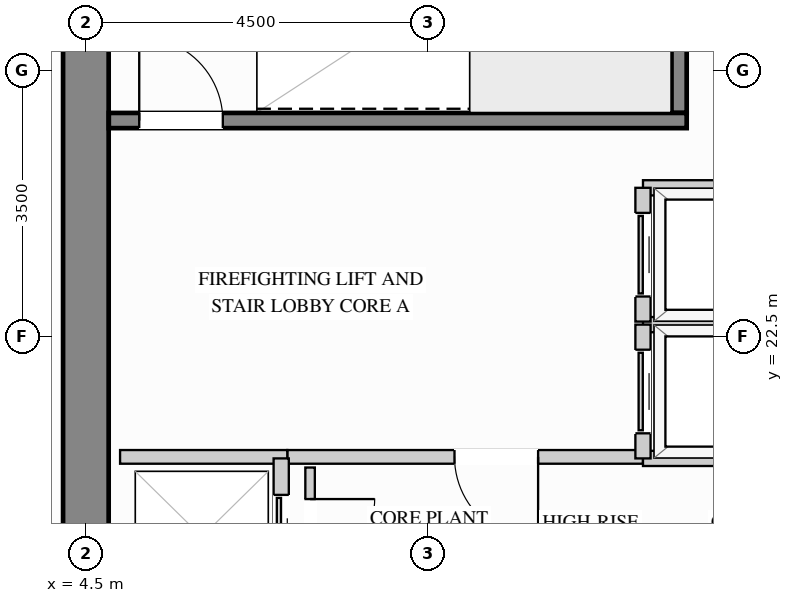
"""IFC4 building model, lengths in metres.
Left out: names, types, materials, properties, quantities, classifications, styles, units other than length and angle.
Written with IfcOpenShell. Run it as: python <this file> out.ifc"""

import sys

from ifc_helpers import new_model, si_unit, direction, frame, frame_2d, origin, place, context, subcontext, project, spatial, rectangle, extrude, source, transform, mapped, element, fill, save


model = new_model("IFC4")
c1 = context("Model", 3, precision=1e-05, world=origin(), true_north=direction((0.0, 1.0)))
c2 = subcontext(c1, "Body", "Model", "MODEL_VIEW")
j1 = project(units=[si_unit("LENGTHUNIT", "METRE"), si_unit("PLANEANGLEUNIT", "RADIAN")], contexts=[c1])
p1 = place(None, origin())
s1 = spatial("IfcSite", under=j1, at=p1, CompositionType="ELEMENT")
p2 = place(p1, origin())
s2 = spatial("IfcBuilding", under=s1, at=p2, CompositionType="ELEMENT")
p3 = place(p2, frame((0.0, 0.0, 175.5)))
s3 = spatial("IfcBuildingStorey", under=s2, at=p3, CompositionType="ELEMENT", Elevation=175.5)
m1 = source(origin(), c2, "Body", "SweptSolid", [
    extrude(rectangle(XDim=20.4, YDim=0.6, at=frame_2d((10.2, 0.0))), origin(), (0.0, 0.0, 1.0), 3.4),
])
p4 = place(p3, frame((4.5, 8.8, 0.0), z_axis=(0.0, 0.0, 1.0), x_axis=(0.0, 1.0, 0.0)))
e1 = element("IfcWall", 1, at=p4, inside=s3, PredefinedType="SHEAR", context=c2, shape_type="MappedRepresentation", body=[
    mapped(m1, transform((0.0, 0.0, 0.0), x_axis=(1.0, 0.0, 0.0), y_axis=(0.0, 1.0, 0.0), z_axis=(0.0, 0.0, 1.0))),
])
p5 = place(p3, frame((7.15, 20.92, 0.0), z_axis=(0.0, 0.0, 1.0), x_axis=(1.0, 0.0, 0.0)))
e2 = element("IfcWall", 2, at=p5, inside=s3, PredefinedType="PARTITIONING", context=c2, shape_type="SweptSolid", body=[
    extrude(rectangle(XDim=4.68, YDim=0.18, at=frame_2d((2.34, 0.0))), origin(), (0.0, 0.0, 1.0), 3.385),
])
p6 = place(p5, frame((2.2, 0.0, 0.0)))
e3 = element("IfcOpeningElement", 3, at=p6, cuts=e2, PredefinedType="OPENING", context=c2, shape_type="SweptSolid", body=[
    extrude(rectangle(XDim=1.1, YDim=2.15, at=frame_2d((0.55, 1.075))), frame((0.0, 0.1, 0.0), z_axis=(0.0, -1.0, 0.0), x_axis=(1.0, 0.0, 0.0)), (0.0, 0.0, 1.0), 0.2),
])
m2 = source(origin(), c2, "Body", "SweptSolid", [
    extrude(rectangle(XDim=2.2, YDim=0.18, at=frame_2d((1.1, 0.0))), origin(), (0.0, 0.0, 1.0), 3.385),
])
p7 = place(p3, frame((4.95, 20.92, 0.0), z_axis=(0.0, 0.0, 1.0), x_axis=(1.0, 0.0, 0.0)))
e4 = element("IfcWall", 4, at=p7, inside=s3, PredefinedType="PARTITIONING", context=c2, shape_type="MappedRepresentation", body=[
    mapped(m2, transform((0.0, 0.0, 0.0), x_axis=(1.0, 0.0, 0.0), y_axis=(0.0, 1.0, 0.0), z_axis=(0.0, 0.0, 1.0))),
])
p8 = place(p3, frame((7.45, 19.2, 0.0), z_axis=(0.0, 0.0, 1.0), x_axis=(0.0, 1.0, 0.0)))
e5 = element("IfcWall", 5, at=p8, inside=s3, PredefinedType="PARTITIONING", context=c2, shape_type="SweptSolid", body=[
    extrude(rectangle(XDim=1.58, YDim=0.125, at=frame_2d((0.79, 0.0))), origin(), (0.0, 0.0, 1.0), 3.385),
])
p9 = place(p8, frame((0.315, 0.0, 0.0)))
e6 = element("IfcOpeningElement", 6, at=p9, cuts=e5, PredefinedType="OPENING", context=c2, shape_type="SweptSolid", body=[
    extrude(rectangle(XDim=0.85, YDim=2.1, at=frame_2d((0.425, 1.05))), frame((0.0, 0.073, 0.0), z_axis=(0.0, -1.0, 0.0), x_axis=(1.0, 0.0, 0.0)), (0.0, 0.0, 1.0), 0.145),
])
m3 = source(origin(), c2, "Body", "SweptSolid", [
    extrude(rectangle(XDim=2.34, YDim=0.2, at=frame_2d((1.17, 0.0))), origin(), (0.0, 0.0, 1.0), 3.385),
])
for number, where, z_axis, x_axis in (
    (7, (11.83, 22.66, 0.0), (0.0, 0.0, 1.0), (1.0, 0.0, 0.0)),
    (8, (11.83, 20.9, 0.0), (0.0, 0.0, 1.0), (1.0, 0.0, 0.0)),
):
    element("IfcWall", number, at=place(p3, frame(where, z_axis=z_axis, x_axis=x_axis)), inside=s3, PredefinedType="PARTITIONING", context=c2, shape_type="MappedRepresentation", body=[
        mapped(m3, transform((0.0, 0.0, 0.0), x_axis=(1.0, 0.0, 0.0), y_axis=(0.0, 1.0, 0.0), z_axis=(0.0, 0.0, 1.0))),
    ])
p10 = place(p3, frame((11.83, 20.9, 0.0), z_axis=(0.0, 0.0, 1.0), x_axis=(0.0, 1.0, 0.0)))
e9 = element("IfcWall", 9, at=p10, inside=s3, PredefinedType="PARTITIONING", context=c2, shape_type="SweptSolid", body=[
    extrude(rectangle(XDim=1.76, YDim=0.2, at=frame_2d((0.88, 0.0))), origin(), (0.0, 0.0, 1.0), 3.385),
])
p11 = place(p10, frame((0.33, 0.0, 0.0)))
e10 = element("IfcOpeningElement", 10, at=p11, cuts=e9, PredefinedType="OPENING", context=c2, shape_type="SweptSolid", body=[
    extrude(rectangle(XDim=1.1, YDim=2.2, at=frame_2d((0.55, 1.1))), frame((0.0, 0.11, 0.0), z_axis=(0.0, -1.0, 0.0), x_axis=(1.0, 0.0, 0.0)), (0.0, 0.0, 1.0), 0.22),
])
p12 = place(p3, frame((11.83, 24.46, 0.0), z_axis=(0.0, 0.0, 1.0), x_axis=(1.0, 0.0, 0.0)))
e11 = element("IfcWall", 11, at=p12, inside=s3, PredefinedType="PARTITIONING", context=c2, shape_type="MappedRepresentation", body=[
    mapped(m3, transform((0.0, 0.0, 0.0), x_axis=(1.0, 0.0, 0.0), y_axis=(0.0, 1.0, 0.0), z_axis=(0.0, 0.0, 1.0))),
])
p13 = place(p3, frame((11.83, 22.7, 0.0), z_axis=(0.0, 0.0, 1.0), x_axis=(0.0, 1.0, 0.0)))
e12 = element("IfcWall", 12, at=p13, inside=s3, PredefinedType="PARTITIONING", context=c2, shape_type="SweptSolid", body=[
    extrude(rectangle(XDim=1.76, YDim=0.2, at=frame_2d((0.88, 0.0))), origin(), (0.0, 0.0, 1.0), 3.385),
])
p14 = place(p13, frame((0.33, 0.0, 0.0)))
e13 = element("IfcOpeningElement", 13, at=p14, cuts=e12, PredefinedType="OPENING", context=c2, shape_type="SweptSolid", body=[
    extrude(rectangle(XDim=1.1, YDim=2.2, at=frame_2d((0.55, 1.1))), frame((0.0, 0.11, 0.0), z_axis=(0.0, -1.0, 0.0), x_axis=(1.0, 0.0, 0.0)), (0.0, 0.0, 1.0), 0.22),
])
p15 = place(p3, frame((7.07, 18.84, 0.0), z_axis=(0.0, 0.0, 1.0), x_axis=(0.0, 1.0, 0.0)))
e14 = element("IfcWall", 14, at=p15, inside=s3, PredefinedType="PARTITIONING", context=c2, shape_type="SweptSolid", body=[
    extrude(rectangle(XDim=2.06, YDim=0.2, at=frame_2d((1.03, 0.0))), origin(), (0.0, 0.0, 1.0), 3.385),
])
p16 = place(p15, frame((0.48, 0.0, 0.0)))
e15 = element("IfcOpeningElement", 15, at=p16, cuts=e14, PredefinedType="OPENING", context=c2, shape_type="SweptSolid", body=[
    extrude(rectangle(XDim=1.1, YDim=2.2, at=frame_2d((0.55, 1.1))), frame((0.0, 0.11, 0.0), z_axis=(0.0, -1.0, 0.0), x_axis=(1.0, 0.0, 0.0)), (0.0, 0.0, 1.0), 0.22),
])
m4 = source(origin(), c2, "Body", "SweptSolid", [
    extrude(rectangle(XDim=3.753, YDim=0.2, at=frame_2d((1.876, 0.0))), origin(), (0.0, 0.0, 1.0), 3.4),
])
p17 = place(p3, frame((12.305, 25.445, 0.0), z_axis=(0.0, 0.0, 1.0), x_axis=(0.0, 1.0, 0.0)))
e16 = element("IfcWall", 16, at=p17, inside=s3, PredefinedType="SHEAR", context=c2, shape_type="MappedRepresentation", body=[
    mapped(m4, transform((0.0, 0.0, 0.0), x_axis=(1.0, 0.0, 0.0), y_axis=(0.0, 1.0, 0.0), z_axis=(0.0, 0.0, 1.0))),
])
p18 = place(p3, frame((4.802, 25.345, 0.0), z_axis=(0.0, 0.0, 1.0), x_axis=(1.0, 0.0, 0.0)))
e17 = element("IfcWall", 17, at=p18, inside=s3, PredefinedType="SHEAR", context=c2, shape_type="SweptSolid", body=[
    extrude(rectangle(XDim=7.603, YDim=0.2, at=frame_2d((3.802, 0.0))), origin(), (0.0, 0.0, 1.0), 3.4),
])
p19 = place(p18, frame((0.4, 0.0, 0.0)))
e18 = element("IfcOpeningElement", 18, at=p19, cuts=e17, PredefinedType="OPENING", context=c2, shape_type="SweptSolid", body=[
    extrude(rectangle(XDim=1.1, YDim=2.15, at=frame_2d((0.55, 1.075))), frame((0.0, 0.11, 0.0), z_axis=(0.0, -1.0, 0.0), x_axis=(1.0, 0.0, 0.0)), (0.0, 0.0, 1.0), 0.22),
])
m5 = source(origin(), c2, "Body", "SweptSolid", [
    extrude(rectangle(XDim=1.1, YDim=2.15, at=frame_2d((0.55, 1.075))), frame((0.0, 0.025, 0.0), z_axis=(0.0, -1.0, 0.0), x_axis=(1.0, 0.0, 0.0)), (0.0, 0.0, 1.0), 0.05),
])
p20 = place(p6, origin())
e19 = element("IfcDoor", 19, at=p20, inside=s3, OperationType="SINGLE_SWING_RIGHT", PredefinedType="DOOR", context=c2, shape_type="MappedRepresentation", body=[
    mapped(m5, transform((0.0, 0.0, 0.0), x_axis=(1.0, 0.0, 0.0), y_axis=(0.0, 1.0, 0.0), z_axis=(0.0, 0.0, 1.0))),
])
fill(e3, e19)
m6 = source(origin(), c2, "Body", "SweptSolid", [
    extrude(rectangle(XDim=1.1, YDim=2.2, at=frame_2d((0.55, 1.1))), frame((0.0, 0.025, 0.0), z_axis=(0.0, -1.0, 0.0), x_axis=(1.0, 0.0, 0.0)), (0.0, 0.0, 1.0), 0.05),
])
p21 = place(p11, origin())
e20 = element("IfcDoor", 20, at=p21, inside=s3, OperationType="SLIDING_TO_LEFT", PredefinedType="DOOR", context=c2, shape_type="MappedRepresentation", body=[
    mapped(m6, transform((0.0, 0.0, 0.0), x_axis=(1.0, 0.0, 0.0), y_axis=(0.0, 1.0, 0.0), z_axis=(0.0, 0.0, 1.0))),
])
fill(e10, e20)
p22 = place(p14, origin())
e21 = element("IfcDoor", 21, at=p22, inside=s3, OperationType="SLIDING_TO_LEFT", PredefinedType="DOOR", context=c2, shape_type="MappedRepresentation", body=[
    mapped(m6, transform((0.0, 0.0, 0.0), x_axis=(1.0, 0.0, 0.0), y_axis=(0.0, 1.0, 0.0), z_axis=(0.0, 0.0, 1.0))),
])
fill(e13, e21)
p23 = place(p16, origin())
e22 = element("IfcDoor", 22, at=p23, inside=s3, OperationType="SLIDING_TO_LEFT", PredefinedType="DOOR", context=c2, shape_type="MappedRepresentation", body=[
    mapped(m6, transform((0.0, 0.0, 0.0), x_axis=(1.0, 0.0, 0.0), y_axis=(0.0, 1.0, 0.0), z_axis=(0.0, 0.0, 1.0))),
])
fill(e15, e22)
m7 = source(origin(), c2, "Body", "SweptSolid", [
    extrude(rectangle(XDim=0.85, YDim=2.1, at=frame_2d((0.425, 1.05))), frame((0.0, 0.025, 0.0), z_axis=(0.0, -1.0, 0.0), x_axis=(1.0, 0.0, 0.0)), (0.0, 0.0, 1.0), 0.05),
])
p24 = place(p9, origin())
e23 = element("IfcDoor", 23, at=p24, inside=s3, OperationType="SINGLE_SWING_RIGHT", PredefinedType="DOOR", context=c2, shape_type="MappedRepresentation", body=[
    mapped(m7, transform((0.0, 0.0, 0.0), x_axis=(1.0, 0.0, 0.0), y_axis=(0.0, 1.0, 0.0), z_axis=(0.0, 0.0, 1.0))),
])
fill(e6, e23)
m8 = source(origin(), c2, "Body", "SweptSolid", [
    extrude(rectangle(XDim=1.1, YDim=2.15, at=frame_2d((0.55, 1.075))), frame((0.0, 0.025, 0.0), z_axis=(0.0, -1.0, 0.0), x_axis=(1.0, 0.0, 0.0)), (0.0, 0.0, 1.0), 0.05),
])
p25 = place(p19, origin())
e24 = element("IfcDoor", 24, at=p25, inside=s3, OperationType="SINGLE_SWING_LEFT", PredefinedType="DOOR", context=c2, shape_type="MappedRepresentation", body=[
    mapped(m8, transform((0.0, 0.0, 0.0), x_axis=(1.0, 0.0, 0.0), y_axis=(0.0, 1.0, 0.0), z_axis=(0.0, 0.0, 1.0))),
])
fill(e18, e24)
save(model, sys.argv[1])
